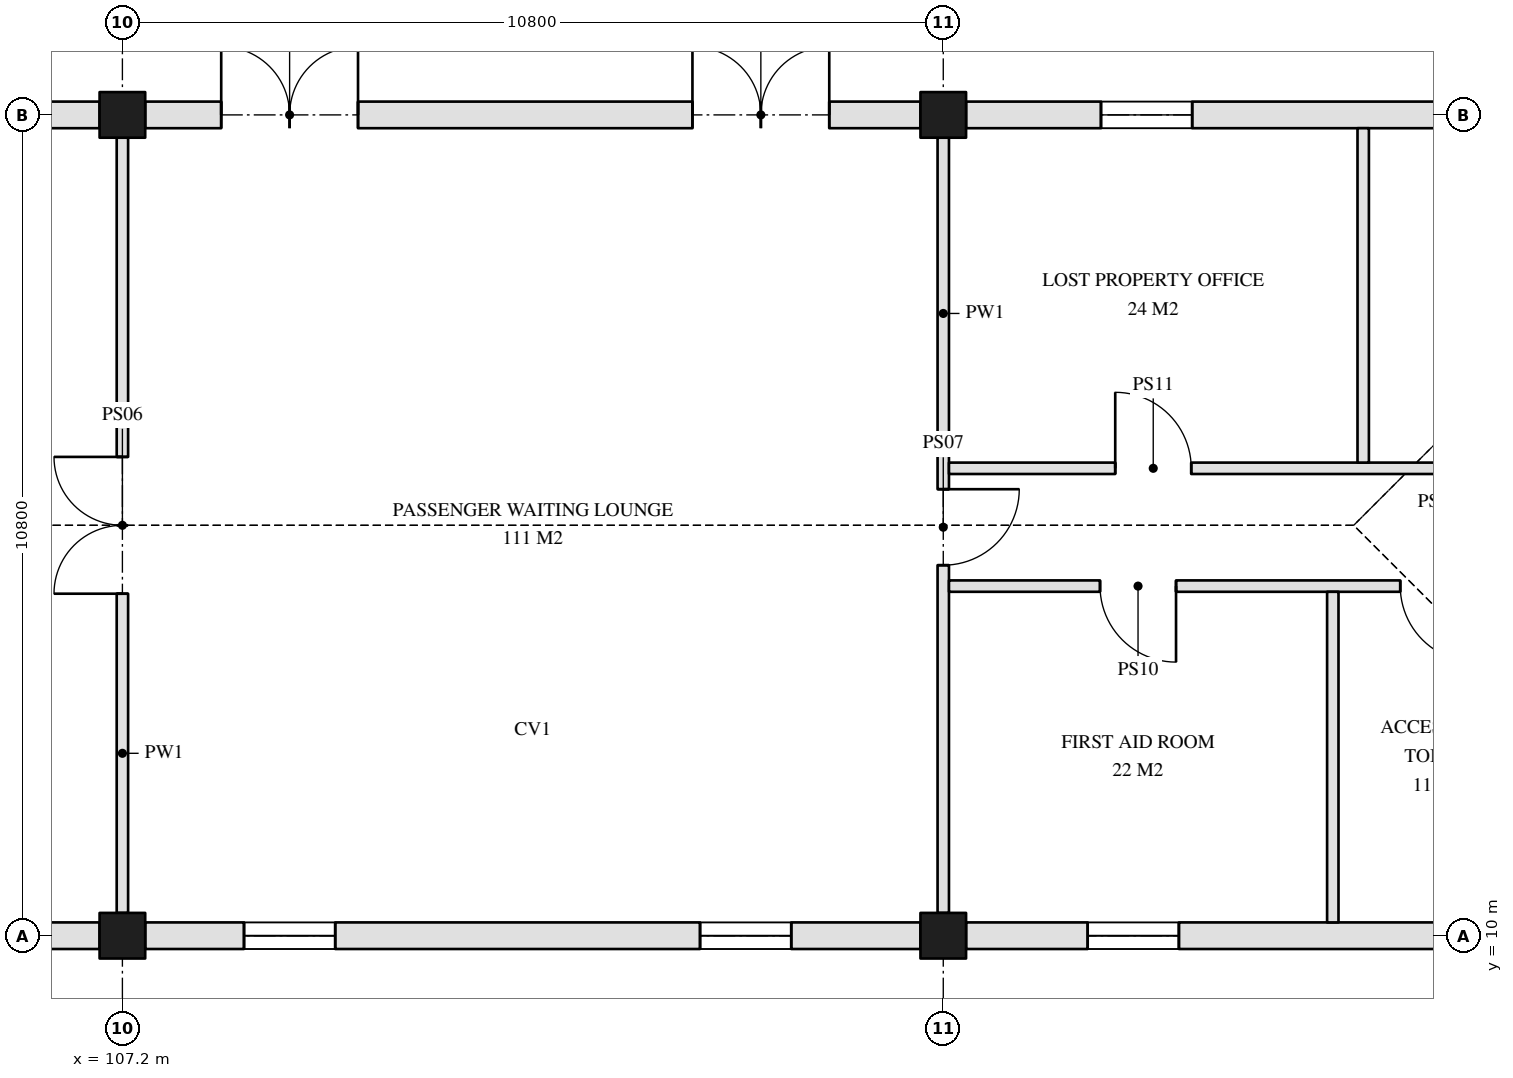
"""IFC4 building model, lengths in metres.
Left out: names, types, materials, properties, quantities, classifications, styles, units other than length and angle.
Written with IfcOpenShell. Run it as: python <this file> out.ifc"""

import sys

from ifc_helpers import new_model, si_unit, direction, frame, frame_2d, origin, origin_2d, place, context, subcontext, project, spatial, rectangle, extrude, element, fill, save


model = new_model("IFC4")
c1 = context("Model", 3, precision=1e-05, world=origin(), true_north=direction((0.0, 1.0)))
c2 = subcontext(c1, "Body", "Model", "MODEL_VIEW")
j1 = project(units=[si_unit("LENGTHUNIT", "METRE"), si_unit("PLANEANGLEUNIT", "RADIAN")], contexts=[c1])
p1 = place(None, origin())
s1 = spatial("IfcSite", under=j1, at=p1, CompositionType="ELEMENT")
p2 = place(p1, origin())
s2 = spatial("IfcBuilding", under=s1, at=p2, CompositionType="ELEMENT")
p3 = place(p2, origin())
s3 = spatial("IfcBuildingStorey", under=s2, at=p3, CompositionType="ELEMENT", Elevation=0.0)
for number, where, z_axis, x_axis in (
    (1, (107.2, 10.0, 0.0), (0.0, 0.0, 1.0), (1.0, 0.0, 0.0)),
    (2, (107.2, 20.8, 0.0), (0.0, 0.0, 1.0), (1.0, 0.0, 0.0)),
    (3, (118.0, 10.0, 0.0), (0.0, 0.0, 1.0), (1.0, 0.0, 0.0)),
    (4, (118.0, 20.8, 0.0), (0.0, 0.0, 1.0), (1.0, 0.0, 0.0)),
):
    element("IfcColumn", number, at=place(p3, frame(where, z_axis=z_axis, x_axis=x_axis)), inside=s3, PredefinedType="COLUMN", context=c2, shape_type="SweptSolid", body=[
        extrude(rectangle(XDim=0.6, YDim=0.6, at=origin_2d()), origin(), (0.0, 0.0, 1.0), 4.5),
    ])
p4 = place(p3, frame((96.7, 10.0, 0.0), z_axis=(0.0, 0.0, 1.0), x_axis=(1.0, 0.0, 0.0)))
e5 = element("IfcWall", 5, at=p4, inside=s3, PredefinedType="SOLIDWALL", context=c2, shape_type="SweptSolid", body=[
    extrude(rectangle(XDim=10.2, YDim=0.35, at=frame_2d((5.1, 0.0))), origin(), (0.0, 0.0, 1.0), 3.9),
])
p5 = place(p4, frame((1.6, 0.0, 0.6)))
e6 = element("IfcOpeningElement", 6, at=p5, cuts=e5, PredefinedType="OPENING", context=c2, shape_type="SweptSolid", body=[
    extrude(rectangle(XDim=1.2, YDim=2.7, at=frame_2d((0.6, 1.35))), frame((0.0, 0.185, 0.0), z_axis=(0.0, -1.0, 0.0), x_axis=(1.0, 0.0, 0.0)), (0.0, 0.0, 1.0), 0.37),
])
p6 = place(p4, frame((7.4, 0.0, 0.6)))
e7 = element("IfcOpeningElement", 7, at=p6, cuts=e5, PredefinedType="OPENING", context=c2, shape_type="SweptSolid", body=[
    extrude(rectangle(XDim=1.2, YDim=2.7, at=frame_2d((0.6, 1.35))), frame((0.0, 0.185, 0.0), z_axis=(0.0, -1.0, 0.0), x_axis=(1.0, 0.0, 0.0)), (0.0, 0.0, 1.0), 0.37),
])
p7 = place(p3, frame((107.5, 10.0, 0.0), z_axis=(0.0, 0.0, 1.0), x_axis=(1.0, 0.0, 0.0)))
e8 = element("IfcWall", 8, at=p7, inside=s3, PredefinedType="SOLIDWALL", context=c2, shape_type="SweptSolid", body=[
    extrude(rectangle(XDim=10.2, YDim=0.35, at=frame_2d((5.1, 0.0))), origin(), (0.0, 0.0, 1.0), 3.9),
])
p8 = place(p7, frame((1.3, 0.0, 0.6)))
e9 = element("IfcOpeningElement", 9, at=p8, cuts=e8, PredefinedType="OPENING", context=c2, shape_type="SweptSolid", body=[
    extrude(rectangle(XDim=1.2, YDim=2.7, at=frame_2d((0.6, 1.35))), frame((0.0, 0.185, 0.0), z_axis=(0.0, -1.0, 0.0), x_axis=(1.0, 0.0, 0.0)), (0.0, 0.0, 1.0), 0.37),
])
p9 = place(p7, frame((7.3, 0.0, 0.6)))
e10 = element("IfcOpeningElement", 10, at=p9, cuts=e8, PredefinedType="OPENING", context=c2, shape_type="SweptSolid", body=[
    extrude(rectangle(XDim=1.2, YDim=2.7, at=frame_2d((0.6, 1.35))), frame((0.0, 0.185, 0.0), z_axis=(0.0, -1.0, 0.0), x_axis=(1.0, 0.0, 0.0)), (0.0, 0.0, 1.0), 0.37),
])
p10 = place(p3, frame((118.3, 10.0, 0.0), z_axis=(0.0, 0.0, 1.0), x_axis=(1.0, 0.0, 0.0)))
e11 = element("IfcWall", 11, at=p10, inside=s3, PredefinedType="SOLIDWALL", context=c2, shape_type="SweptSolid", body=[
    extrude(rectangle(XDim=10.2, YDim=0.35, at=frame_2d((5.1, 0.0))), origin(), (0.0, 0.0, 1.0), 3.9),
])
p11 = place(p10, frame((1.6, 0.0, 0.6)))
e12 = element("IfcOpeningElement", 12, at=p11, cuts=e11, PredefinedType="OPENING", context=c2, shape_type="SweptSolid", body=[
    extrude(rectangle(XDim=1.2, YDim=2.7, at=frame_2d((0.6, 1.35))), frame((0.0, 0.185, 0.0), z_axis=(0.0, -1.0, 0.0), x_axis=(1.0, 0.0, 0.0)), (0.0, 0.0, 1.0), 0.37),
])
p12 = place(p3, frame((96.7, 20.8, 0.0), z_axis=(0.0, 0.0, 1.0), x_axis=(1.0, 0.0, 0.0)))
e13 = element("IfcWall", 13, at=p12, inside=s3, PredefinedType="SOLIDWALL", context=c2, shape_type="SweptSolid", body=[
    extrude(rectangle(XDim=10.2, YDim=0.35, at=frame_2d((5.1, 0.0))), origin(), (0.0, 0.0, 1.0), 3.9),
])
p13 = place(p12, frame((1.8, 0.0, 0.0)))
e14 = element("IfcOpeningElement", 14, at=p13, cuts=e13, PredefinedType="OPENING", context=c2, shape_type="SweptSolid", body=[
    extrude(rectangle(XDim=1.8, YDim=2.4, at=frame_2d((0.9, 1.2))), frame((0.0, 0.185, 0.0), z_axis=(0.0, -1.0, 0.0), x_axis=(1.0, 0.0, 0.0)), (0.0, 0.0, 1.0), 0.37),
])
p14 = place(p12, frame((6.6, 0.0, 0.6)))
e15 = element("IfcOpeningElement", 15, at=p14, cuts=e13, PredefinedType="OPENING", context=c2, shape_type="SweptSolid", body=[
    extrude(rectangle(XDim=1.2, YDim=2.7, at=frame_2d((0.6, 1.35))), frame((0.0, 0.185, 0.0), z_axis=(0.0, -1.0, 0.0), x_axis=(1.0, 0.0, 0.0)), (0.0, 0.0, 1.0), 0.37),
])
p15 = place(p3, frame((107.5, 20.8, 0.0), z_axis=(0.0, 0.0, 1.0), x_axis=(1.0, 0.0, 0.0)))
e16 = element("IfcWall", 16, at=p15, inside=s3, PredefinedType="SOLIDWALL", context=c2, shape_type="SweptSolid", body=[
    extrude(rectangle(XDim=10.2, YDim=0.35, at=frame_2d((5.1, 0.0))), origin(), (0.0, 0.0, 1.0), 3.9),
])
p16 = place(p15, frame((1.0, 0.0, 0.0)))
e17 = element("IfcOpeningElement", 17, at=p16, cuts=e16, PredefinedType="OPENING", context=c2, shape_type="SweptSolid", body=[
    extrude(rectangle(XDim=1.8, YDim=2.4, at=frame_2d((0.9, 1.2))), frame((0.0, 0.185, 0.0), z_axis=(0.0, -1.0, 0.0), x_axis=(1.0, 0.0, 0.0)), (0.0, 0.0, 1.0), 0.37),
])
p17 = place(p15, frame((7.2, 0.0, 0.0)))
e18 = element("IfcOpeningElement", 18, at=p17, cuts=e16, PredefinedType="OPENING", context=c2, shape_type="SweptSolid", body=[
    extrude(rectangle(XDim=1.8, YDim=2.4, at=frame_2d((0.9, 1.2))), frame((0.0, 0.185, 0.0), z_axis=(0.0, -1.0, 0.0), x_axis=(1.0, 0.0, 0.0)), (0.0, 0.0, 1.0), 0.37),
])
p18 = place(p3, frame((118.3, 20.8, 0.0), z_axis=(0.0, 0.0, 1.0), x_axis=(1.0, 0.0, 0.0)))
e19 = element("IfcWall", 19, at=p18, inside=s3, PredefinedType="SOLIDWALL", context=c2, shape_type="SweptSolid", body=[
    extrude(rectangle(XDim=10.2, YDim=0.35, at=frame_2d((5.1, 0.0))), origin(), (0.0, 0.0, 1.0), 3.9),
])
p19 = place(p18, frame((1.775, 0.0, 0.6)))
e20 = element("IfcOpeningElement", 20, at=p19, cuts=e19, PredefinedType="OPENING", context=c2, shape_type="SweptSolid", body=[
    extrude(rectangle(XDim=1.2, YDim=2.7, at=frame_2d((0.6, 1.35))), frame((0.0, 0.185, 0.0), z_axis=(0.0, -1.0, 0.0), x_axis=(1.0, 0.0, 0.0)), (0.0, 0.0, 1.0), 0.37),
])
p20 = place(p18, frame((7.2, 0.0, 0.6)))
e21 = element("IfcOpeningElement", 21, at=p20, cuts=e19, PredefinedType="OPENING", context=c2, shape_type="SweptSolid", body=[
    extrude(rectangle(XDim=1.2, YDim=2.7, at=frame_2d((0.6, 1.35))), frame((0.0, 0.185, 0.0), z_axis=(0.0, -1.0, 0.0), x_axis=(1.0, 0.0, 0.0)), (0.0, 0.0, 1.0), 0.37),
])
p21 = place(p3, frame((107.2, 10.3, 0.0), z_axis=(0.0, 0.0, 1.0), x_axis=(0.0, 1.0, 0.0)))
e22 = element("IfcWall", 22, at=p21, inside=s3, PredefinedType="PARTITIONING", context=c2, shape_type="SweptSolid", body=[
    extrude(rectangle(XDim=10.2, YDim=0.15, at=frame_2d((5.1, 0.0))), origin(), (0.0, 0.0, 1.0), 3.9),
])
p22 = place(p21, frame((4.2, 0.0, 0.0)))
e23 = element("IfcOpeningElement", 23, at=p22, cuts=e22, PredefinedType="OPENING", context=c2, shape_type="SweptSolid", body=[
    extrude(rectangle(XDim=1.8, YDim=2.1, at=frame_2d((0.9, 1.05))), frame((0.0, 0.085, 0.0), z_axis=(0.0, -1.0, 0.0), x_axis=(1.0, 0.0, 0.0)), (0.0, 0.0, 1.0), 0.17),
])
p23 = place(p3, frame((118.0, 20.5, 0.0), z_axis=(0.0, 0.0, 1.0), x_axis=(0.0, -1.0, 0.0)))
e24 = element("IfcWall", 24, at=p23, inside=s3, PredefinedType="PARTITIONING", context=c2, shape_type="SweptSolid", body=[
    extrude(rectangle(XDim=10.2, YDim=0.15, at=frame_2d((5.1, 0.0))), origin(), (0.0, 0.0, 1.0), 3.9),
])
p24 = place(p23, frame((4.625, 0.0, 0.0)))
e25 = element("IfcOpeningElement", 25, at=p24, cuts=e24, PredefinedType="OPENING", context=c2, shape_type="SweptSolid", body=[
    extrude(rectangle(XDim=1.0, YDim=2.1, at=frame_2d((0.5, 1.05))), frame((0.0, 0.085, 0.0), z_axis=(0.0, -1.0, 0.0), x_axis=(1.0, 0.0, 0.0)), (0.0, 0.0, 1.0), 0.17),
])
p25 = place(p3, frame((125.925, 14.6, 0.0), z_axis=(0.0, 0.0, 1.0), x_axis=(-1.0, 0.0, 0.0)))
e26 = element("IfcWall", 26, at=p25, inside=s3, PredefinedType="PARTITIONING", context=c2, shape_type="SweptSolid", body=[
    extrude(rectangle(XDim=7.85, YDim=0.15, at=frame_2d((3.925, 0.0))), origin(), (0.0, 0.0, 1.0), 3.9),
])
p26 = place(p25, frame((0.913, 0.0, 0.0)))
e27 = element("IfcOpeningElement", 27, at=p26, cuts=e26, PredefinedType="OPENING", context=c2, shape_type="SweptSolid", body=[
    extrude(rectangle(XDim=1.0, YDim=2.1, at=frame_2d((0.5, 1.05))), frame((0.0, 0.085, 0.0), z_axis=(0.0, -1.0, 0.0), x_axis=(1.0, 0.0, 0.0)), (0.0, 0.0, 1.0), 0.17),
])
p27 = place(p25, frame((4.863, 0.0, 0.0)))
e28 = element("IfcOpeningElement", 28, at=p27, cuts=e26, PredefinedType="OPENING", context=c2, shape_type="SweptSolid", body=[
    extrude(rectangle(XDim=1.0, YDim=2.1, at=frame_2d((0.5, 1.05))), frame((0.0, 0.085, 0.0), z_axis=(0.0, -1.0, 0.0), x_axis=(1.0, 0.0, 0.0)), (0.0, 0.0, 1.0), 0.17),
])
p28 = place(p3, frame((123.125, 10.175, 0.0), z_axis=(0.0, 0.0, 1.0), x_axis=(0.0, 1.0, 0.0)))
e29 = element("IfcWall", 29, at=p28, inside=s3, PredefinedType="PARTITIONING", context=c2, shape_type="SweptSolid", body=[
    extrude(rectangle(XDim=4.35, YDim=0.15, at=frame_2d((2.175, 0.0))), origin(), (0.0, 0.0, 1.0), 3.9),
])
p29 = place(p3, frame((118.075, 16.15, 0.0), z_axis=(0.0, 0.0, 1.0), x_axis=(1.0, 0.0, 0.0)))
e30 = element("IfcWall", 30, at=p29, inside=s3, PredefinedType="PARTITIONING", context=c2, shape_type="SweptSolid", body=[
    extrude(rectangle(XDim=10.55, YDim=0.15, at=frame_2d((5.275, 0.0))), origin(), (0.0, 0.0, 1.0), 3.9),
])
p30 = place(p29, frame((2.188, 0.0, 0.0)))
e31 = element("IfcOpeningElement", 31, at=p30, cuts=e30, PredefinedType="OPENING", context=c2, shape_type="SweptSolid", body=[
    extrude(rectangle(XDim=1.0, YDim=2.1, at=frame_2d((0.5, 1.05))), frame((0.0, 0.085, 0.0), z_axis=(0.0, -1.0, 0.0), x_axis=(1.0, 0.0, 0.0)), (0.0, 0.0, 1.0), 0.17),
])
p31 = place(p29, frame((7.538, 0.0, 0.0)))
e32 = element("IfcOpeningElement", 32, at=p31, cuts=e30, PredefinedType="OPENING", context=c2, shape_type="SweptSolid", body=[
    extrude(rectangle(XDim=1.0, YDim=2.1, at=frame_2d((0.5, 1.05))), frame((0.0, 0.085, 0.0), z_axis=(0.0, -1.0, 0.0), x_axis=(1.0, 0.0, 0.0)), (0.0, 0.0, 1.0), 0.17),
])
p32 = place(p3, frame((123.525, 16.225, 0.0), z_axis=(0.0, 0.0, 1.0), x_axis=(0.0, 1.0, 0.0)))
e33 = element("IfcWall", 33, at=p32, inside=s3, PredefinedType="PARTITIONING", context=c2, shape_type="SweptSolid", body=[
    extrude(rectangle(XDim=4.4, YDim=0.15, at=frame_2d((2.2, 0.0))), origin(), (0.0, 0.0, 1.0), 3.9),
])
p33 = place(p8, origin())
e34 = element("IfcWindow", 34, at=p33, inside=s3, PartitioningType="SINGLE_PANEL", PredefinedType="WINDOW", context=c2, shape_type="SweptSolid", body=[
    extrude(rectangle(XDim=1.2, YDim=2.7, at=frame_2d((0.6, 1.35))), frame((0.0, 0.03, 0.0), z_axis=(0.0, -1.0, 0.0), x_axis=(1.0, 0.0, 0.0)), (0.0, 0.0, 1.0), 0.06),
])
fill(e9, e34)
p34 = place(p9, origin())
e35 = element("IfcWindow", 35, at=p34, inside=s3, PartitioningType="SINGLE_PANEL", PredefinedType="WINDOW", context=c2, shape_type="SweptSolid", body=[
    extrude(rectangle(XDim=1.2, YDim=2.7, at=frame_2d((0.6, 1.35))), frame((0.0, 0.03, 0.0), z_axis=(0.0, -1.0, 0.0), x_axis=(1.0, 0.0, 0.0)), (0.0, 0.0, 1.0), 0.06),
])
fill(e10, e35)
p35 = place(p11, origin())
e36 = element("IfcWindow", 36, at=p35, inside=s3, PartitioningType="SINGLE_PANEL", PredefinedType="WINDOW", context=c2, shape_type="SweptSolid", body=[
    extrude(rectangle(XDim=1.2, YDim=2.7, at=frame_2d((0.6, 1.35))), frame((0.0, 0.03, 0.0), z_axis=(0.0, -1.0, 0.0), x_axis=(1.0, 0.0, 0.0)), (0.0, 0.0, 1.0), 0.06),
])
fill(e12, e36)
p36 = place(p16, origin())
e37 = element("IfcDoor", 37, at=p36, inside=s3, OperationType="SINGLE_SWING_LEFT", PredefinedType="DOOR", context=c2, shape_type="SweptSolid", body=[
    extrude(rectangle(XDim=1.8, YDim=2.4, at=frame_2d((0.9, 1.2))), frame((0.0, 0.025, 0.0), z_axis=(0.0, -1.0, 0.0), x_axis=(1.0, 0.0, 0.0)), (0.0, 0.0, 1.0), 0.05),
])
fill(e17, e37)
p37 = place(p17, origin())
e38 = element("IfcDoor", 38, at=p37, inside=s3, OperationType="SINGLE_SWING_LEFT", PredefinedType="DOOR", context=c2, shape_type="SweptSolid", body=[
    extrude(rectangle(XDim=1.8, YDim=2.4, at=frame_2d((0.9, 1.2))), frame((0.0, 0.025, 0.0), z_axis=(0.0, -1.0, 0.0), x_axis=(1.0, 0.0, 0.0)), (0.0, 0.0, 1.0), 0.05),
])
fill(e18, e38)
p38 = place(p19, origin())
e39 = element("IfcWindow", 39, at=p38, inside=s3, PartitioningType="SINGLE_PANEL", PredefinedType="WINDOW", context=c2, shape_type="SweptSolid", body=[
    extrude(rectangle(XDim=1.2, YDim=2.7, at=frame_2d((0.6, 1.35))), frame((0.0, 0.03, 0.0), z_axis=(0.0, -1.0, 0.0), x_axis=(1.0, 0.0, 0.0)), (0.0, 0.0, 1.0), 0.06),
])
fill(e20, e39)
p39 = place(p22, origin())
e40 = element("IfcDoor", 40, at=p39, inside=s3, OperationType="SINGLE_SWING_LEFT", PredefinedType="DOOR", context=c2, shape_type="SweptSolid", body=[
    extrude(rectangle(XDim=1.8, YDim=2.1, at=frame_2d((0.9, 1.05))), frame((0.0, 0.025, 0.0), z_axis=(0.0, -1.0, 0.0), x_axis=(1.0, 0.0, 0.0)), (0.0, 0.0, 1.0), 0.05),
])
fill(e23, e40)
p40 = place(p24, origin())
e41 = element("IfcDoor", 41, at=p40, inside=s3, OperationType="SINGLE_SWING_LEFT", PredefinedType="DOOR", context=c2, shape_type="SweptSolid", body=[
    extrude(rectangle(XDim=1.0, YDim=2.1, at=frame_2d((0.5, 1.05))), frame((0.0, 0.025, 0.0), z_axis=(0.0, -1.0, 0.0), x_axis=(1.0, 0.0, 0.0)), (0.0, 0.0, 1.0), 0.05),
])
fill(e25, e41)
p41 = place(p26, origin())
e42 = element("IfcDoor", 42, at=p41, inside=s3, OperationType="SINGLE_SWING_LEFT", PredefinedType="DOOR", context=c2, shape_type="SweptSolid", body=[
    extrude(rectangle(XDim=1.0, YDim=2.1, at=frame_2d((0.5, 1.05))), frame((0.0, 0.025, 0.0), z_axis=(0.0, -1.0, 0.0), x_axis=(1.0, 0.0, 0.0)), (0.0, 0.0, 1.0), 0.05),
])
fill(e27, e42)
p42 = place(p27, origin())
e43 = element("IfcDoor", 43, at=p42, inside=s3, OperationType="SINGLE_SWING_LEFT", PredefinedType="DOOR", context=c2, shape_type="SweptSolid", body=[
    extrude(rectangle(XDim=1.0, YDim=2.1, at=frame_2d((0.5, 1.05))), frame((0.0, 0.025, 0.0), z_axis=(0.0, -1.0, 0.0), x_axis=(1.0, 0.0, 0.0)), (0.0, 0.0, 1.0), 0.05),
])
fill(e28, e43)
p43 = place(p30, origin())
e44 = element("IfcDoor", 44, at=p43, inside=s3, OperationType="SINGLE_SWING_LEFT", PredefinedType="DOOR", context=c2, shape_type="SweptSolid", body=[
    extrude(rectangle(XDim=1.0, YDim=2.1, at=frame_2d((0.5, 1.05))), frame((0.0, 0.025, 0.0), z_axis=(0.0, -1.0, 0.0), x_axis=(1.0, 0.0, 0.0)), (0.0, 0.0, 1.0), 0.05),
])
fill(e31, e44)
save(model, sys.argv[1])
